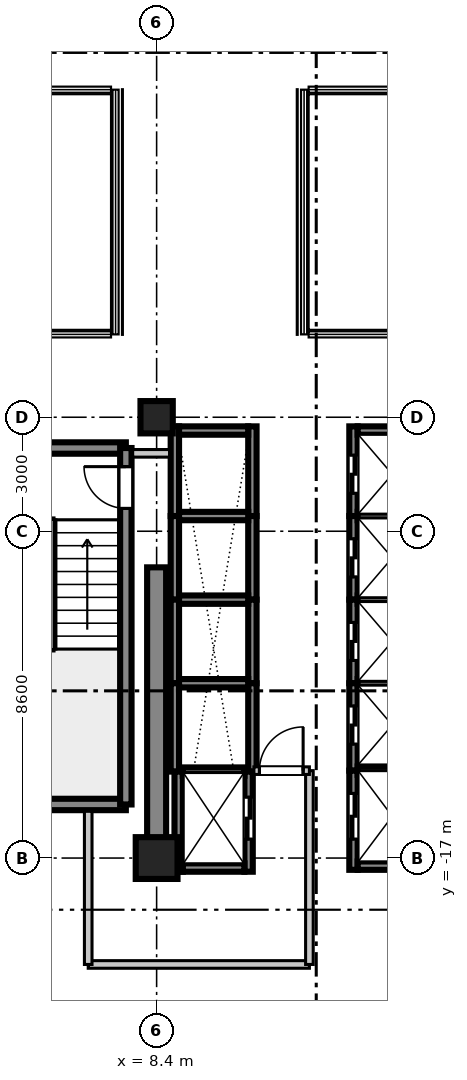
"""IFC4 building model, lengths in metres.
Left out: names, types, materials, properties, quantities, classifications, styles, units other than length and angle.
Written with IfcOpenShell. Run it as: python <this file> out.ifc"""

import sys

from ifc_helpers import new_model, si_unit, direction, frame, frame_2d, origin, origin_2d, place, context, subcontext, project, spatial, rectangle, extrude, source, transform, mapped, element, fill, save


model = new_model("IFC4")
c1 = context("Model", 3, precision=1e-05, world=origin(), true_north=direction((0.0, 1.0)))
c2 = subcontext(c1, "Body", "Model", "MODEL_VIEW")
j1 = project(units=[si_unit("LENGTHUNIT", "METRE"), si_unit("PLANEANGLEUNIT", "RADIAN")], contexts=[c1])
p1 = place(None, origin())
s1 = spatial("IfcSite", under=j1, at=p1, CompositionType="ELEMENT")
p2 = place(p1, origin())
s2 = spatial("IfcBuilding", under=s1, at=p2, CompositionType="ELEMENT")
p3 = place(p2, frame((0.0, 0.0, 163.6)))
s3 = spatial("IfcBuildingStorey", under=s2, at=p3, CompositionType="ELEMENT", Elevation=163.6)
m1 = source(origin(), c2, "Body", "SweptSolid", [
    extrude(rectangle(XDim=1.1, YDim=1.1, at=origin_2d()), origin(), (0.0, 0.0, 1.0), 3.605),
])
p4 = place(p3, frame((8.4, -17.0, 0.0), z_axis=(0.0, 0.0, 1.0), x_axis=(1.0, 0.0, 0.0)))
e1 = element("IfcColumn", 1, at=p4, inside=s3, PredefinedType="COLUMN", context=c2, shape_type="MappedRepresentation", body=[
    mapped(m1, transform((0.0, 0.0, 0.0), scale=1.0)),
])
m2 = source(origin(), c2, "Body", "SweptSolid", [
    extrude(rectangle(XDim=0.85, YDim=0.85, at=origin_2d()), origin(), (0.0, 0.0, 1.0), 3.605),
])
p5 = place(p3, frame((8.4, -5.4, 0.0), z_axis=(0.0, 0.0, 1.0), x_axis=(1.0, 0.0, 0.0)))
e2 = element("IfcColumn", 2, at=p5, inside=s3, PredefinedType="PILASTER", context=c2, shape_type="MappedRepresentation", body=[
    mapped(m2, transform((0.0, 0.0, 0.0), scale=1.0)),
])
m3 = source(origin(), c2, "Body", "SweptSolid", [
    extrude(rectangle(XDim=7.65, YDim=0.5, at=frame_2d((3.825, 0.0))), origin(), (0.0, 0.0, 1.0), 3.39),
])
p6 = place(p3, frame((8.4, -17.0, 0.0), z_axis=(0.0, 0.0, 1.0), x_axis=(0.0, 1.0, 0.0)))
e3 = element("IfcWall", 3, at=p6, inside=s3, PredefinedType="SHEAR", context=c2, shape_type="MappedRepresentation", body=[
    mapped(m3, transform((0.0, 0.0, 0.0), scale=1.0)),
])
m4 = source(origin(), c2, "Body", "SweptSolid", [
    extrude(rectangle(XDim=3.98, YDim=0.3, at=frame_2d((1.99, 0.0))), origin(), (0.0, 0.0, 1.0), 3.39),
])
for number, where, z_axis, x_axis in (
    (4, (3.61, -15.59, 0.0), (0.0, 0.0, 1.0), (1.0, 0.0, 0.0)),
    (5, (3.61, -6.21, 0.0), (0.0, 0.0, 1.0), (1.0, 0.0, 0.0)),
):
    element("IfcWall", number, at=place(p3, frame(where, z_axis=z_axis, x_axis=x_axis)), inside=s3, PredefinedType="SHEAR", context=c2, shape_type="MappedRepresentation", body=[
        mapped(m4, transform((0.0, 0.0, 0.0), scale=1.0)),
    ])
m5 = source(origin(), c2, "Body", "SweptSolid", [
    extrude(rectangle(XDim=9.38, YDim=0.3, at=frame_2d((4.69, 0.0))), origin(), (0.0, 0.0, 1.0), 3.39),
])
p7 = place(p3, frame((7.59, -15.59, 0.0), z_axis=(0.0, 0.0, 1.0), x_axis=(0.0, 1.0, 0.0)))
e6 = element("IfcWall", 6, at=p7, inside=s3, PredefinedType="SHEAR", context=c2, shape_type="MappedRepresentation", body=[
    mapped(m5, transform((0.0, 0.0, 0.0), scale=1.0)),
])
p8 = place(p7, frame((7.79, 0.0, 0.0)))
e7 = element("IfcOpeningElement", 7, at=p8, cuts=e6, PredefinedType="OPENING", context=c2, shape_type="SweptSolid", body=[
    extrude(rectangle(XDim=1.1, YDim=2.15, at=frame_2d((0.55, 1.075))), frame((0.0, 0.16, 0.0), z_axis=(0.0, -1.0, 0.0), x_axis=(1.0, 0.0, 0.0)), (0.0, 0.0, 1.0), 0.32),
])
m6 = source(origin(), c2, "Body", "SweptSolid", [
    extrude(rectangle(XDim=2.36, YDim=0.22, at=frame_2d((1.18, 0.0))), origin(), (0.0, 0.0, 1.0), 3.39),
])
p9 = place(p3, frame((13.58, -8.0, 0.0), z_axis=(0.0, 0.0, 1.0), x_axis=(0.0, 1.0, 0.0)))
e8 = element("IfcWall", 8, at=p9, inside=s3, PredefinedType="SHEAR", context=c2, shape_type="MappedRepresentation", body=[
    mapped(m6, transform((0.0, 0.0, 0.0), scale=1.0)),
])
p10 = place(p9, frame((0.6, 0.0, 0.0)))
e9 = element("IfcOpeningElement", 9, at=p10, cuts=e8, PredefinedType="OPENING", context=c2, shape_type="SweptSolid", body=[
    extrude(rectangle(XDim=1.0, YDim=2.2, at=frame_2d((0.5, 1.1))), frame((0.0, 0.12, 0.0), z_axis=(0.0, -1.0, 0.0), x_axis=(1.0, 0.0, 0.0)), (0.0, 0.0, 1.0), 0.24),
])
m7 = source(origin(), c2, "Body", "SweptSolid", [
    extrude(rectangle(XDim=1.82, YDim=0.22, at=frame_2d((0.91, 0.0))), origin(), (0.0, 0.0, 1.0), 3.39),
])
p11 = place(p3, frame((13.69, -5.75, 0.0), z_axis=(0.0, 0.0, 1.0), x_axis=(1.0, 0.0, 0.0)))
e10 = element("IfcWall", 10, at=p11, inside=s3, PredefinedType="SHEAR", context=c2, shape_type="MappedRepresentation", body=[
    mapped(m7, transform((0.0, 0.0, 0.0), scale=1.0)),
])
m8 = source(origin(), c2, "Body", "SweptSolid", [
    extrude(rectangle(XDim=2.2, YDim=0.22, at=frame_2d((1.1, 0.0))), origin(), (0.0, 0.0, 1.0), 3.39),
])
p12 = place(p3, frame((13.58, -10.2, 0.0), z_axis=(0.0, 0.0, 1.0), x_axis=(0.0, 1.0, 0.0)))
e11 = element("IfcWall", 11, at=p12, inside=s3, PredefinedType="SHEAR", context=c2, shape_type="MappedRepresentation", body=[
    mapped(m8, transform((0.0, 0.0, 0.0), scale=1.0)),
])
p13 = place(p12, frame((0.6, 0.0, 0.0)))
e12 = element("IfcOpeningElement", 12, at=p13, cuts=e11, PredefinedType="OPENING", context=c2, shape_type="SweptSolid", body=[
    extrude(rectangle(XDim=1.0, YDim=2.2, at=frame_2d((0.5, 1.1))), frame((0.0, 0.12, 0.0), z_axis=(0.0, -1.0, 0.0), x_axis=(1.0, 0.0, 0.0)), (0.0, 0.0, 1.0), 0.24),
])
m9 = source(origin(), c2, "Body", "SweptSolid", [
    extrude(rectangle(XDim=1.82, YDim=0.22, at=frame_2d((0.91, 0.0))), origin(), (0.0, 0.0, 1.0), 3.65),
])
p14 = place(p3, frame((13.69, -8.0, 0.0), z_axis=(0.0, 0.0, 1.0), x_axis=(1.0, 0.0, 0.0)))
e13 = element("IfcWall", 13, at=p14, inside=s3, PredefinedType="SHEAR", context=c2, shape_type="MappedRepresentation", body=[
    mapped(m9, transform((0.0, 0.0, 0.0), scale=1.0)),
])
p15 = place(p3, frame((13.58, -12.4, 0.0), z_axis=(0.0, 0.0, 1.0), x_axis=(0.0, 1.0, 0.0)))
e14 = element("IfcWall", 14, at=p15, inside=s3, PredefinedType="SHEAR", context=c2, shape_type="MappedRepresentation", body=[
    mapped(m8, transform((0.0, 0.0, 0.0), scale=1.0)),
])
p16 = place(p15, frame((0.6, 0.0, 0.0)))
e15 = element("IfcOpeningElement", 15, at=p16, cuts=e14, PredefinedType="OPENING", context=c2, shape_type="SweptSolid", body=[
    extrude(rectangle(XDim=1.0, YDim=2.2, at=frame_2d((0.5, 1.1))), frame((0.0, 0.12, 0.0), z_axis=(0.0, -1.0, 0.0), x_axis=(1.0, 0.0, 0.0)), (0.0, 0.0, 1.0), 0.24),
])
p17 = place(p3, frame((13.69, -10.2, 0.0), z_axis=(0.0, 0.0, 1.0), x_axis=(1.0, 0.0, 0.0)))
e16 = element("IfcWall", 16, at=p17, inside=s3, PredefinedType="SHEAR", context=c2, shape_type="MappedRepresentation", body=[
    mapped(m9, transform((0.0, 0.0, 0.0), scale=1.0)),
])
m10 = source(origin(), c2, "Body", "SweptSolid", [
    extrude(rectangle(XDim=2.3, YDim=0.22, at=frame_2d((1.15, 0.0))), origin(), (0.0, 0.0, 1.0), 3.39),
])
p18 = place(p3, frame((13.58, -14.7, 0.0), z_axis=(0.0, 0.0, 1.0), x_axis=(0.0, 1.0, 0.0)))
e17 = element("IfcWall", 17, at=p18, inside=s3, PredefinedType="SHEAR", context=c2, shape_type="MappedRepresentation", body=[
    mapped(m10, transform((0.0, 0.0, 0.0), scale=1.0)),
])
p19 = place(p18, frame((0.7, 0.0, 0.0)))
e18 = element("IfcOpeningElement", 18, at=p19, cuts=e17, PredefinedType="OPENING", context=c2, shape_type="SweptSolid", body=[
    extrude(rectangle(XDim=1.0, YDim=2.2, at=frame_2d((0.5, 1.1))), frame((0.0, 0.12, 0.0), z_axis=(0.0, -1.0, 0.0), x_axis=(1.0, 0.0, 0.0)), (0.0, 0.0, 1.0), 0.24),
])
p20 = place(p3, frame((13.69, -12.4, 0.0), z_axis=(0.0, 0.0, 1.0), x_axis=(1.0, 0.0, 0.0)))
e19 = element("IfcWall", 19, at=p20, inside=s3, PredefinedType="SHEAR", context=c2, shape_type="MappedRepresentation", body=[
    mapped(m9, transform((0.0, 0.0, 0.0), scale=1.0)),
])
for number, where, z_axis, x_axis in (
    (20, (8.88, -8.0, 0.0), (0.0, 0.0, 1.0), (0.0, 1.0, 0.0)),
    (21, (10.92, -8.0, 0.0), (0.0, 0.0, 1.0), (0.0, 1.0, 0.0)),
):
    element("IfcWall", number, at=place(p3, frame(where, z_axis=z_axis, x_axis=x_axis)), inside=s3, PredefinedType="SHEAR", context=c2, shape_type="MappedRepresentation", body=[
        mapped(m6, transform((0.0, 0.0, 0.0), scale=1.0)),
    ])
p21 = place(p3, frame((8.99, -5.75, 0.0), z_axis=(0.0, 0.0, 1.0), x_axis=(1.0, 0.0, 0.0)))
e22 = element("IfcWall", 22, at=p21, inside=s3, PredefinedType="SHEAR", context=c2, shape_type="MappedRepresentation", body=[
    mapped(m7, transform((0.0, 0.0, 0.0), scale=1.0)),
])
for number, where, z_axis, x_axis in (
    (23, (8.88, -10.2, 0.0), (0.0, 0.0, 1.0), (0.0, 1.0, 0.0)),
    (24, (10.92, -10.2, 0.0), (0.0, 0.0, 1.0), (0.0, 1.0, 0.0)),
):
    element("IfcWall", number, at=place(p3, frame(where, z_axis=z_axis, x_axis=x_axis)), inside=s3, PredefinedType="SHEAR", context=c2, shape_type="MappedRepresentation", body=[
        mapped(m8, transform((0.0, 0.0, 0.0), scale=1.0)),
    ])
p22 = place(p3, frame((8.99, -8.0, 0.0), z_axis=(0.0, 0.0, 1.0), x_axis=(1.0, 0.0, 0.0)))
e25 = element("IfcWall", 25, at=p22, inside=s3, PredefinedType="SHEAR", context=c2, shape_type="MappedRepresentation", body=[
    mapped(m9, transform((0.0, 0.0, 0.0), scale=1.0)),
])
for number, where, z_axis, x_axis in (
    (26, (8.88, -12.4, 0.0), (0.0, 0.0, 1.0), (0.0, 1.0, 0.0)),
    (27, (10.92, -12.4, 0.0), (0.0, 0.0, 1.0), (0.0, 1.0, 0.0)),
):
    element("IfcWall", number, at=place(p3, frame(where, z_axis=z_axis, x_axis=x_axis)), inside=s3, PredefinedType="SHEAR", context=c2, shape_type="MappedRepresentation", body=[
        mapped(m8, transform((0.0, 0.0, 0.0), scale=1.0)),
    ])
p23 = place(p3, frame((8.99, -10.2, 0.0), z_axis=(0.0, 0.0, 1.0), x_axis=(1.0, 0.0, 0.0)))
e28 = element("IfcWall", 28, at=p23, inside=s3, PredefinedType="SHEAR", context=c2, shape_type="MappedRepresentation", body=[
    mapped(m9, transform((0.0, 0.0, 0.0), scale=1.0)),
])
m11 = source(origin(), c2, "Body", "SweptSolid", [
    extrude(rectangle(XDim=2.325, YDim=0.22, at=frame_2d((1.163, 0.0))), origin(), (0.0, 0.0, 1.0), 3.39),
])
for number, where, z_axis, x_axis in (
    (29, (8.88, -14.725, 0.0), (0.0, 0.0, 1.0), (0.0, 1.0, 0.0)),
    (30, (10.92, -14.725, 0.0), (0.0, 0.0, 1.0), (0.0, 1.0, 0.0)),
):
    element("IfcWall", number, at=place(p3, frame(where, z_axis=z_axis, x_axis=x_axis)), inside=s3, PredefinedType="SHEAR", context=c2, shape_type="MappedRepresentation", body=[
        mapped(m11, transform((0.0, 0.0, 0.0), scale=1.0)),
    ])
p24 = place(p3, frame((8.99, -12.4, 0.0), z_axis=(0.0, 0.0, 1.0), x_axis=(1.0, 0.0, 0.0)))
e31 = element("IfcWall", 31, at=p24, inside=s3, PredefinedType="SHEAR", context=c2, shape_type="MappedRepresentation", body=[
    mapped(m9, transform((0.0, 0.0, 0.0), scale=1.0)),
])
m12 = source(origin(), c2, "Body", "SweptSolid", [
    extrude(rectangle(XDim=2.635, YDim=0.22, at=frame_2d((1.317, 0.0))), origin(), (0.0, 0.0, 1.0), 3.39),
])
p25 = place(p3, frame((8.98, -17.36, 0.0), z_axis=(0.0, 0.0, 1.0), x_axis=(0.0, 1.0, 0.0)))
e32 = element("IfcWall", 32, at=p25, inside=s3, PredefinedType="SHEAR", context=c2, shape_type="MappedRepresentation", body=[
    mapped(m12, transform((0.0, 0.0, 0.0), scale=1.0)),
])
p26 = place(p3, frame((10.82, -17.36, 0.0), z_axis=(0.0, 0.0, 1.0), x_axis=(0.0, 1.0, 0.0)))
e33 = element("IfcWall", 33, at=p26, inside=s3, PredefinedType="SHEAR", context=c2, shape_type="MappedRepresentation", body=[
    mapped(m12, transform((0.0, 0.0, 0.0), scale=1.0)),
])
p27 = place(p26, frame((0.86, 0.0, 0.0)))
e34 = element("IfcOpeningElement", 34, at=p27, cuts=e33, PredefinedType="OPENING", context=c2, shape_type="SweptSolid", body=[
    extrude(rectangle(XDim=1.1, YDim=2.2, at=frame_2d((0.55, 1.1))), frame((0.0, 0.12, 0.0), z_axis=(0.0, -1.0, 0.0), x_axis=(1.0, 0.0, 0.0)), (0.0, 0.0, 1.0), 0.24),
])
m13 = source(origin(), c2, "Body", "SweptSolid", [
    extrude(rectangle(XDim=1.62, YDim=0.22, at=frame_2d((0.81, 0.0))), origin(), (0.0, 0.0, 1.0), 3.39),
])
p28 = place(p3, frame((9.09, -17.25, 0.0), z_axis=(0.0, 0.0, 1.0), x_axis=(1.0, 0.0, 0.0)))
e35 = element("IfcWall", 35, at=p28, inside=s3, PredefinedType="SHEAR", context=c2, shape_type="MappedRepresentation", body=[
    mapped(m13, transform((0.0, 0.0, 0.0), scale=1.0)),
])
m14 = source(origin(), c2, "Body", "SweptSolid", [
    extrude(rectangle(XDim=1.62, YDim=0.22, at=frame_2d((0.81, 0.0))), origin(), (0.0, 0.0, 1.0), 3.65),
])
p29 = place(p3, frame((9.09, -14.725, 0.0), z_axis=(0.0, 0.0, 1.0), x_axis=(1.0, 0.0, 0.0)))
e36 = element("IfcWall", 36, at=p29, inside=s3, PredefinedType="SHEAR", context=c2, shape_type="MappedRepresentation", body=[
    mapped(m14, transform((0.0, 0.0, 0.0), scale=1.0)),
])
m15 = source(origin(), c2, "Body", "SweptSolid", [
    extrude(rectangle(XDim=2.61, YDim=0.22, at=frame_2d((1.305, 0.0))), origin(), (0.0, 0.0, 1.0), 3.39),
])
p30 = place(p3, frame((13.58, -17.31, 0.0), z_axis=(0.0, 0.0, 1.0), x_axis=(0.0, 1.0, 0.0)))
e37 = element("IfcWall", 37, at=p30, inside=s3, PredefinedType="SHEAR", context=c2, shape_type="MappedRepresentation", body=[
    mapped(m15, transform((0.0, 0.0, 0.0), scale=1.0)),
])
p31 = place(p30, frame((0.81, 0.0, 0.0)))
e38 = element("IfcOpeningElement", 38, at=p31, cuts=e37, PredefinedType="OPENING", context=c2, shape_type="SweptSolid", body=[
    extrude(rectangle(XDim=1.2, YDim=2.2, at=frame_2d((0.6, 1.1))), frame((0.0, 0.12, 0.0), z_axis=(0.0, -1.0, 0.0), x_axis=(1.0, 0.0, 0.0)), (0.0, 0.0, 1.0), 0.24),
])
p32 = place(p3, frame((13.69, -17.2, 0.0), z_axis=(0.0, 0.0, 1.0), x_axis=(1.0, 0.0, 0.0)))
e39 = element("IfcWall", 39, at=p32, inside=s3, PredefinedType="SHEAR", context=c2, shape_type="MappedRepresentation", body=[
    mapped(m7, transform((0.0, 0.0, 0.0), scale=1.0)),
])
p33 = place(p3, frame((13.69, -14.7, 0.0), z_axis=(0.0, 0.0, 1.0), x_axis=(1.0, 0.0, 0.0)))
e40 = element("IfcWall", 40, at=p33, inside=s3, PredefinedType="SHEAR", context=c2, shape_type="MappedRepresentation", body=[
    mapped(m9, transform((0.0, 0.0, 0.0), scale=1.0)),
])
m16 = source(origin(), c2, "Body", "SweptSolid", [
    extrude(rectangle(XDim=5.82, YDim=0.2, at=frame_2d((2.91, 0.0))), origin(), (0.0, 0.0, 1.0), 2.73),
])
p34 = place(p3, frame((6.6, -19.8, 0.0), z_axis=(0.0, 0.0, 1.0), x_axis=(1.0, 0.0, 0.0)))
e41 = element("IfcWall", 41, at=p34, inside=s3, PredefinedType="PARTITIONING", context=c2, shape_type="MappedRepresentation", body=[
    mapped(m16, transform((0.0, 0.0, 0.0), scale=1.0)),
])
m17 = source(origin(), c2, "Body", "SweptSolid", [
    extrude(rectangle(XDim=4.03, YDim=0.2, at=frame_2d((2.015, 0.0))), origin(), (0.0, 0.0, 1.0), 2.73),
])
p35 = place(p3, frame((6.6, -19.8, 0.0), z_axis=(0.0, 0.0, 1.0), x_axis=(0.0, 1.0, 0.0)))
e42 = element("IfcWall", 42, at=p35, inside=s3, PredefinedType="PARTITIONING", context=c2, shape_type="MappedRepresentation", body=[
    mapped(m17, transform((0.0, 0.0, 0.0), scale=1.0)),
])
m18 = source(origin(), c2, "Body", "SweptSolid", [
    extrude(rectangle(XDim=5.1, YDim=0.2, at=frame_2d((2.55, 0.0))), origin(), (0.0, 0.0, 1.0), 2.73),
])
p36 = place(p3, frame((12.42, -19.8, 0.0), z_axis=(0.0, 0.0, 1.0), x_axis=(0.0, 1.0, 0.0)))
e43 = element("IfcWall", 43, at=p36, inside=s3, PredefinedType="PARTITIONING", context=c2, shape_type="MappedRepresentation", body=[
    mapped(m18, transform((0.0, 0.0, 0.0), scale=1.0)),
])
m19 = source(origin(), c2, "Body", "SweptSolid", [
    extrude(rectangle(XDim=1.46, YDim=0.2, at=frame_2d((0.73, 0.0))), origin(), (0.0, 0.0, 1.0), 2.73),
])
p37 = place(p3, frame((10.96, -14.7, 0.0), z_axis=(0.0, 0.0, 1.0), x_axis=(1.0, 0.0, 0.0)))
e44 = element("IfcWall", 44, at=p37, inside=s3, PredefinedType="PARTITIONING", context=c2, shape_type="MappedRepresentation", body=[
    mapped(m19, transform((0.0, 0.0, 0.0), scale=1.0)),
])
p38 = place(p37, frame((0.145, 0.0, 0.0)))
e45 = element("IfcOpeningElement", 45, at=p38, cuts=e44, PredefinedType="OPENING", context=c2, shape_type="SweptSolid", body=[
    extrude(rectangle(XDim=1.15, YDim=2.15, at=frame_2d((0.575, 1.075))), frame((0.0, 0.11, 0.0), z_axis=(0.0, -1.0, 0.0), x_axis=(1.0, 0.0, 0.0)), (0.0, 0.0, 1.0), 0.22),
])
m20 = source(origin(), c2, "Body", "SweptSolid", [
    extrude(rectangle(XDim=0.97, YDim=0.2, at=frame_2d((0.485, 0.0))), origin(), (0.0, 0.0, 1.0), 2.73),
])
p39 = place(p3, frame((7.77, -6.35, 0.0), z_axis=(0.0, 0.0, 1.0), x_axis=(1.0, 0.0, 0.0)))
e46 = element("IfcWall", 46, at=p39, inside=s3, PredefinedType="PARTITIONING", context=c2, shape_type="MappedRepresentation", body=[
    mapped(m20, transform((0.0, 0.0, 0.0), scale=1.0)),
])
m21 = source(origin(), c2, "Body", "SweptSolid", [
    extrude(rectangle(XDim=1.1, YDim=2.15, at=frame_2d((0.55, 1.075))), frame((0.0, 0.025, 0.0), z_axis=(0.0, -1.0, 0.0), x_axis=(1.0, 0.0, 0.0)), (0.0, 0.0, 1.0), 0.05),
])
p40 = place(p8, origin())
e47 = element("IfcDoor", 47, at=p40, inside=s3, OperationType="SINGLE_SWING_RIGHT", PredefinedType="DOOR", context=c2, shape_type="MappedRepresentation", body=[
    mapped(m21, transform((0.0, 0.0, 0.0), scale=1.0)),
])
fill(e7, e47)
m22 = source(origin(), c2, "Body", "SweptSolid", [
    extrude(rectangle(XDim=1.0, YDim=2.2, at=frame_2d((0.5, 1.1))), frame((0.0, 0.025, 0.0), z_axis=(0.0, -1.0, 0.0), x_axis=(1.0, 0.0, 0.0)), (0.0, 0.0, 1.0), 0.05),
])
p41 = place(p10, origin())
e48 = element("IfcDoor", 48, at=p41, inside=s3, OperationType="DOUBLE_DOOR_SLIDING", PredefinedType="DOOR", context=c2, shape_type="MappedRepresentation", body=[
    mapped(m22, transform((0.0, 0.0, 0.0), scale=1.0)),
])
fill(e9, e48)
p42 = place(p13, origin())
e49 = element("IfcDoor", 49, at=p42, inside=s3, OperationType="DOUBLE_DOOR_SLIDING", PredefinedType="DOOR", context=c2, shape_type="MappedRepresentation", body=[
    mapped(m22, transform((0.0, 0.0, 0.0), scale=1.0)),
])
fill(e12, e49)
p43 = place(p16, origin())
e50 = element("IfcDoor", 50, at=p43, inside=s3, OperationType="DOUBLE_DOOR_SLIDING", PredefinedType="DOOR", context=c2, shape_type="MappedRepresentation", body=[
    mapped(m22, transform((0.0, 0.0, 0.0), scale=1.0)),
])
fill(e15, e50)
p44 = place(p19, origin())
e51 = element("IfcDoor", 51, at=p44, inside=s3, OperationType="DOUBLE_DOOR_SLIDING", PredefinedType="DOOR", context=c2, shape_type="MappedRepresentation", body=[
    mapped(m22, transform((0.0, 0.0, 0.0), scale=1.0)),
])
fill(e18, e51)
m23 = source(origin(), c2, "Body", "SweptSolid", [
    extrude(rectangle(XDim=1.1, YDim=2.2, at=frame_2d((0.55, 1.1))), frame((0.0, 0.025, 0.0), z_axis=(0.0, -1.0, 0.0), x_axis=(1.0, 0.0, 0.0)), (0.0, 0.0, 1.0), 0.05),
])
p45 = place(p27, frame((1.1, 0.0, 0.0), z_axis=(0.0, 0.0, 1.0), x_axis=(-1.0, 0.0, 0.0)))
e52 = element("IfcDoor", 52, at=p45, inside=s3, OperationType="DOUBLE_DOOR_SLIDING", PredefinedType="DOOR", context=c2, shape_type="MappedRepresentation", body=[
    mapped(m23, transform((0.0, 0.0, 0.0), scale=1.0)),
])
fill(e34, e52)
m24 = source(origin(), c2, "Body", "SweptSolid", [
    extrude(rectangle(XDim=1.2, YDim=2.2, at=frame_2d((0.6, 1.1))), frame((0.0, 0.025, 0.0), z_axis=(0.0, -1.0, 0.0), x_axis=(1.0, 0.0, 0.0)), (0.0, 0.0, 1.0), 0.05),
])
p46 = place(p31, origin())
e53 = element("IfcDoor", 53, at=p46, inside=s3, OperationType="DOUBLE_DOOR_SLIDING", PredefinedType="DOOR", context=c2, shape_type="MappedRepresentation", body=[
    mapped(m24, transform((0.0, 0.0, 0.0), scale=1.0)),
])
fill(e38, e53)
m25 = source(origin(), c2, "Body", "SweptSolid", [
    extrude(rectangle(XDim=1.15, YDim=2.15, at=frame_2d((0.575, 1.075))), frame((0.0, 0.025, 0.0), z_axis=(0.0, -1.0, 0.0), x_axis=(1.0, 0.0, 0.0)), (0.0, 0.0, 1.0), 0.05),
])
p47 = place(p38, origin())
e54 = element("IfcDoor", 54, at=p47, inside=s3, OperationType="SINGLE_SWING_RIGHT", PredefinedType="DOOR", context=c2, shape_type="MappedRepresentation", body=[
    mapped(m25, transform((0.0, 0.0, 0.0), scale=1.0)),
])
fill(e45, e54)
save(model, sys.argv[1])
